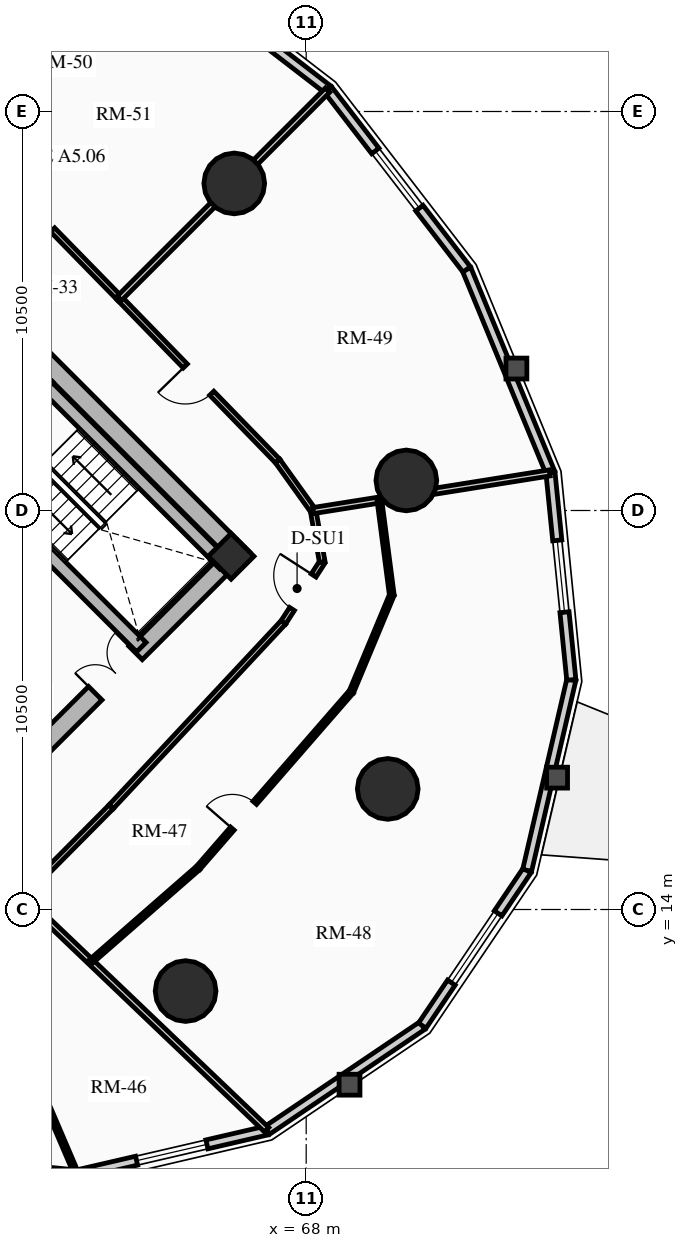
"""IFC4 building model, lengths in metres.
Left out: names, types, materials, properties, quantities, classifications, styles, units other than length and angle.
Written with IfcOpenShell. Run it as: python <this file> out.ifc"""

import sys

from ifc_helpers import new_model, si_unit, direction, frame, frame_2d, origin, origin_2d, place, context, subcontext, project, spatial, rectangle, circle, extrude, source, transform, mapped, element, fill, save


model = new_model("IFC4")
c1 = context("Model", 3, precision=1e-05, world=origin(), true_north=direction((0.0, 1.0)))
c2 = subcontext(c1, "Body", "Model", "MODEL_VIEW")
j1 = project(units=[si_unit("LENGTHUNIT", "METRE"), si_unit("PLANEANGLEUNIT", "RADIAN")], contexts=[c1])
p1 = place(None, origin())
s1 = spatial("IfcSite", under=j1, at=p1, CompositionType="ELEMENT")
p2 = place(p1, origin())
s2 = spatial("IfcBuilding", under=s1, at=p2, CompositionType="ELEMENT")
p3 = place(p2, frame((0.0, 0.0, 51.1)))
s3 = spatial("IfcBuildingStorey", under=s2, at=p3, CompositionType="ELEMENT", Elevation=51.1)
p4 = place(p3, frame((66.339, 23.227, 0.0), z_axis=(0.0, 0.0, 1.0), x_axis=(-0.707106781187, 0.707106781187, 0.0)))
e1 = element("IfcWall", 1, at=p4, inside=s3, PredefinedType="SHEAR", context=c2, shape_type="SweptSolid", body=[
    extrude(rectangle(XDim=14.3, YDim=0.5, at=frame_2d((7.15, 0.0))), origin(), (0.0, 0.0, 1.0), 2.91),
])
p5 = place(p3, frame((58.596, 15.838, 0.0), z_axis=(0.0, 0.0, 1.0), x_axis=(0.707106781187, 0.707106781187, 0.0)))
e2 = element("IfcWall", 2, at=p5, inside=s3, PredefinedType="SHEAR", context=c2, shape_type="SweptSolid", body=[
    extrude(rectangle(XDim=10.7, YDim=0.5, at=frame_2d((5.35, 0.0))), origin(), (0.0, 0.0, 1.0), 2.91),
])
m1 = source(origin(), c2, "Body", "SweptSolid", [
    extrude(rectangle(XDim=1.5, YDim=2.02, at=frame_2d((0.75, 1.01))), frame((0.0, 0.26, 0.0), z_axis=(0.0, -1.0, 0.0), x_axis=(1.0, 0.0, 0.0)), (0.0, 0.0, 1.0), 0.52),
])
p6 = place(p5, frame((5.45, 0.0, 0.0)))
e3 = element("IfcOpeningElement", 3, at=p6, cuts=e2, PredefinedType="OPENING", context=c2, shape_type="MappedRepresentation", body=[
    mapped(m1, transform((0.0, 0.0, 0.0), x_axis=(1.0, 0.0, 0.0), y_axis=(0.0, 1.0, 0.0), z_axis=(0.0, 0.0, 1.0), scale=1.0)),
])
p7 = place(p3, frame((63.662, 20.904, 0.0), z_axis=(0.0, 0.0, 1.0), x_axis=(-0.707106781187, 0.707106781187, 0.0)))
e4 = element("IfcWall", 4, at=p7, inside=s3, PredefinedType="SHEAR", context=c2, shape_type="SweptSolid", body=[
    extrude(rectangle(XDim=13.8, YDim=0.35, at=frame_2d((6.9, 0.0))), origin(), (0.0, 0.0, 1.0), 2.91),
])
m2 = source(origin(), c2, "Body", "SweptSolid", [
    extrude(rectangle(XDim=1.1, YDim=2.015, at=frame_2d((0.55, 1.007))), frame((0.0, 0.185, 0.0), z_axis=(0.0, -1.0, 0.0), x_axis=(1.0, 0.0, 0.0)), (0.0, 0.0, 1.0), 0.37),
])
p8 = place(p7, frame((10.025, 0.0, 0.0)))
e5 = element("IfcOpeningElement", 5, at=p8, cuts=e4, PredefinedType="OPENING", context=c2, shape_type="MappedRepresentation", body=[
    mapped(m2, transform((0.0, 0.0, 0.0), x_axis=(1.0, 0.0, 0.0), y_axis=(0.0, 1.0, 0.0), z_axis=(0.0, 0.0, 1.0), scale=1.0)),
])
p9 = place(p7, frame((12.025, 0.0, 0.0)))
e6 = element("IfcOpeningElement", 6, at=p9, cuts=e4, PredefinedType="OPENING", context=c2, shape_type="MappedRepresentation", body=[
    mapped(m2, transform((0.0, 0.0, 0.0), x_axis=(1.0, 0.0, 0.0), y_axis=(0.0, 1.0, 0.0), z_axis=(0.0, 0.0, 1.0), scale=1.0)),
])
m3 = source(origin(), c2, "Body", "SweptSolid", [
    extrude(rectangle(XDim=1.15, YDim=2.02, at=frame_2d((0.575, 1.01))), frame((0.0, 0.185, 0.0), z_axis=(0.0, -1.0, 0.0), x_axis=(1.0, 0.0, 0.0)), (0.0, 0.0, 1.0), 0.37),
])
p10 = place(p7, frame((5.33, 0.0, 0.0)))
e7 = element("IfcOpeningElement", 7, at=p10, cuts=e4, PredefinedType="OPENING", context=c2, shape_type="MappedRepresentation", body=[
    mapped(m3, transform((0.0, 0.0, 0.0), x_axis=(1.0, 0.0, 0.0), y_axis=(0.0, 1.0, 0.0), z_axis=(0.0, 0.0, 1.0), scale=1.0)),
])
p11 = place(p3, frame((65.847, 23.089, 0.0), z_axis=(0.0, 0.0, 1.0), x_axis=(-0.707106781187, 0.707106781187, 0.0)))
e8 = element("IfcWall", 8, at=p11, inside=s3, PredefinedType="SHEAR", context=c2, shape_type="SweptSolid", body=[
    extrude(rectangle(XDim=6.745, YDim=0.35, at=frame_2d((3.373, 0.0))), origin(), (0.0, 0.0, 1.0), 2.91),
])
p12 = place(p3, frame((58.893, 25.674, 0.0), z_axis=(0.0, 0.0, 1.0), x_axis=(0.707106781187, 0.707106781187, 0.0)))
e9 = element("IfcWall", 9, at=p12, inside=s3, PredefinedType="SHEAR", context=c2, shape_type="SweptSolid", body=[
    extrude(rectangle(XDim=3.285, YDim=0.35, at=frame_2d((1.643, 0.0))), origin(), (0.0, 0.0, 1.0), 2.91),
])
p13 = place(p3, frame((66.024, 23.294, 0.0), z_axis=(0.0, 0.0, 1.0), x_axis=(0.707106781187, 0.707106781187, 0.0)))
e10 = element("IfcColumn", 10, at=p13, inside=s3, PredefinedType="COLUMN", context=c2, shape_type="SweptSolid", body=[
    extrude(rectangle(XDim=0.85, YDim=0.85, at=origin_2d()), origin(), (0.0, 0.0, 1.0), 2.91),
])
for number, where, z_axis, x_axis in (
    (11, (66.107, 33.107, 0.0), (0.0, 0.0, 1.0), (1.0, 0.0, 0.0)),
    (12, (64.827, 11.854, 0.0), (0.0, 0.0, 1.0), (1.0, 0.0, 0.0)),
    (13, (70.146, 17.173, 0.0), (0.0, 0.0, 1.0), (1.0, 0.0, 0.0)),
    (14, (70.635, 25.291, 0.0), (0.0, 0.0, 1.0), (1.0, 0.0, 0.0)),
):
    element("IfcColumn", number, at=place(p3, frame(where, z_axis=z_axis, x_axis=x_axis)), inside=s3, PredefinedType="USERDEFINED", context=c2, shape_type="SweptSolid", body=[
        extrude(circle(Radius=0.8, at=origin_2d()), origin(), (0.0, 0.0, 1.0), 2.91),
    ])
p14 = place(p3, frame((63.844, 39.222, 0.0), z_axis=(0.0, 0.0, 1.0), x_axis=(0.792014314407, -0.610502519057, 0.0)))
e15 = element("IfcWall", 15, at=p14, inside=s3, PredefinedType="SOLIDWALL", context=c2, shape_type="SweptSolid", body=[
    extrude(rectangle(XDim=5.973, YDim=0.24, at=frame_2d((2.987, 0.0))), origin(), (0.0, 0.0, 1.0), 2.073),
])
p15 = place(p3, frame((61.957, 7.024, 0.0), z_axis=(0.0, 0.0, 1.0), x_axis=(-0.994970765694, 0.100165739718, 0.0)))
e16 = element("IfcWall", 16, at=p15, inside=s3, PredefinedType="SOLIDWALL", context=c2, shape_type="SweptSolid", body=[
    extrude(rectangle(XDim=5.477, YDim=0.24, at=frame_2d((2.738, 0.0))), origin(), (0.0, 0.0, 1.0), 2.073),
])
m4 = source(origin(), c2, "Body", "SweptSolid", [
    extrude(rectangle(XDim=2.2, YDim=1.35, at=frame_2d((1.1, 0.675))), frame((0.0, 0.13, 0.0), z_axis=(0.0, -1.0, 0.0), x_axis=(1.0, 0.0, 0.0)), (0.0, 0.0, 1.0), 0.26),
])
p16 = place(p15, frame((1.638, 0.0, 0.65)))
e17 = element("IfcOpeningElement", 17, at=p16, cuts=e16, PredefinedType="OPENING", context=c2, shape_type="MappedRepresentation", body=[
    mapped(m4, transform((0.0, 0.0, 0.0), x_axis=(1.0, 0.0, 0.0), y_axis=(0.0, 1.0, 0.0), z_axis=(0.0, 0.0, 1.0), scale=1.0)),
])
p17 = place(p3, frame((66.969, 8.186, 0.0), z_axis=(0.0, 0.0, 1.0), x_axis=(-0.974166016949, -0.225833060959, 0.0)))
e18 = element("IfcWall", 18, at=p17, inside=s3, PredefinedType="SOLIDWALL", context=c2, shape_type="SweptSolid", body=[
    extrude(rectangle(XDim=5.146, YDim=0.24, at=frame_2d((2.573, 0.0))), origin(), (0.0, 0.0, 1.0), 2.073),
])
m5 = source(origin(), c2, "Body", "SweptSolid", [
    extrude(rectangle(XDim=1.9, YDim=1.35, at=frame_2d((0.95, 0.675))), frame((0.0, 0.13, 0.0), z_axis=(0.0, -1.0, 0.0), x_axis=(1.0, 0.0, 0.0)), (0.0, 0.0, 1.0), 0.26),
])
p18 = place(p17, frame((1.623, 0.0, 0.65)))
e19 = element("IfcOpeningElement", 19, at=p18, cuts=e18, PredefinedType="OPENING", context=c2, shape_type="MappedRepresentation", body=[
    mapped(m5, transform((0.0, 0.0, 0.0), x_axis=(1.0, 0.0, 0.0), y_axis=(0.0, 1.0, 0.0), z_axis=(0.0, 0.0, 1.0), scale=1.0)),
])
p19 = place(p3, frame((71.055, 10.945, 0.0), z_axis=(0.0, 0.0, 1.0), x_axis=(-0.828736708604, -0.559638693991, 0.0)))
e20 = element("IfcWall", 20, at=p19, inside=s3, PredefinedType="SOLIDWALL", context=c2, shape_type="SweptSolid", body=[
    extrude(rectangle(XDim=4.93, YDim=0.24, at=frame_2d((2.465, 0.0))), origin(), (0.0, 0.0, 1.0), 2.073),
])
p20 = place(p3, frame((73.814, 15.031, 0.0), z_axis=(0.0, 0.0, 1.0), x_axis=(-0.559638693991, -0.828736708604, 0.0)))
e21 = element("IfcWall", 21, at=p20, inside=s3, PredefinedType="SOLIDWALL", context=c2, shape_type="SweptSolid", body=[
    extrude(rectangle(XDim=4.93, YDim=0.24, at=frame_2d((2.465, 0.0))), origin(), (0.0, 0.0, 1.0), 2.073),
])
p21 = place(p20, frame((1.365, 0.0, 0.65)))
e22 = element("IfcOpeningElement", 22, at=p21, cuts=e21, PredefinedType="OPENING", context=c2, shape_type="MappedRepresentation", body=[
    mapped(m4, transform((0.0, 0.0, 0.0), x_axis=(1.0, 0.0, 0.0), y_axis=(0.0, 1.0, 0.0), z_axis=(0.0, 0.0, 1.0), scale=1.0)),
])
p22 = place(p3, frame((74.976, 20.043, 0.0), z_axis=(0.0, 0.0, 1.0), x_axis=(-0.225833060959, -0.974166016949, 0.0)))
e23 = element("IfcWall", 23, at=p22, inside=s3, PredefinedType="SOLIDWALL", context=c2, shape_type="SweptSolid", body=[
    extrude(rectangle(XDim=5.146, YDim=0.24, at=frame_2d((2.573, 0.0))), origin(), (0.0, 0.0, 1.0), 2.073),
])
p23 = place(p3, frame((74.428, 25.493, 0.0), z_axis=(0.0, 0.0, 1.0), x_axis=(0.100165739718, -0.994970765694, 0.0)))
e24 = element("IfcWall", 24, at=p23, inside=s3, PredefinedType="SOLIDWALL", context=c2, shape_type="SweptSolid", body=[
    extrude(rectangle(XDim=5.477, YDim=0.24, at=frame_2d((2.738, 0.0))), origin(), (0.0, 0.0, 1.0), 2.073),
])
p24 = place(p23, frame((1.788, 0.0, 0.65)))
e25 = element("IfcOpeningElement", 25, at=p24, cuts=e24, PredefinedType="OPENING", context=c2, shape_type="MappedRepresentation", body=[
    mapped(m5, transform((0.0, 0.0, 0.0), x_axis=(1.0, 0.0, 0.0), y_axis=(0.0, 1.0, 0.0), z_axis=(0.0, 0.0, 1.0), scale=1.0)),
])
p25 = place(p3, frame((72.222, 30.844, 0.0), z_axis=(0.0, 0.0, 1.0), x_axis=(0.381027682565, -0.924563629567, 0.0)))
e26 = element("IfcWall", 26, at=p25, inside=s3, PredefinedType="SOLIDWALL", context=c2, shape_type="SweptSolid", body=[
    extrude(rectangle(XDim=5.789, YDim=0.24, at=frame_2d((2.894, 0.0))), origin(), (0.0, 0.0, 1.0), 2.073),
])
p26 = place(p3, frame((68.575, 35.575, 0.0), z_axis=(0.0, 0.0, 1.0), x_axis=(0.610502519057, -0.792014314407, 0.0)))
e27 = element("IfcWall", 27, at=p26, inside=s3, PredefinedType="SOLIDWALL", context=c2, shape_type="SweptSolid", body=[
    extrude(rectangle(XDim=5.973, YDim=0.24, at=frame_2d((2.987, 0.0))), origin(), (0.0, 0.0, 1.0), 2.073),
])
p27 = place(p26, frame((2.037, 0.0, 0.65)))
e28 = element("IfcOpeningElement", 28, at=p27, cuts=e27, PredefinedType="OPENING", context=c2, shape_type="MappedRepresentation", body=[
    mapped(m5, transform((0.0, 0.0, 0.0), x_axis=(1.0, 0.0, 0.0), y_axis=(0.0, 1.0, 0.0), z_axis=(0.0, 0.0, 1.0), scale=1.0)),
])
p28 = place(p3, frame((63.086, 30.086, 0.0), z_axis=(0.0, 0.0, 1.0), x_axis=(-0.699032802832, 0.715089603172, 0.0)))
e29 = element("IfcWall", 29, at=p28, inside=s3, PredefinedType="PARTITIONING", context=c2, shape_type="SweptSolid", body=[
    extrude(rectangle(XDim=6.082, YDim=0.15, at=frame_2d((3.041, 0.0))), origin(), (0.0, 0.0, 1.0), 2.159),
])
m6 = source(origin(), c2, "Body", "SweptSolid", [
    extrude(rectangle(XDim=1.05, YDim=2.015, at=frame_2d((0.525, 1.007))), frame((0.0, 0.085, 0.0), z_axis=(0.0, -1.0, 0.0), x_axis=(1.0, 0.0, 0.0)), (0.0, 0.0, 1.0), 0.17),
])
p29 = place(p28, frame((2.516, 0.0, 0.0)))
e30 = element("IfcOpeningElement", 30, at=p29, cuts=e29, PredefinedType="OPENING", context=c2, shape_type="MappedRepresentation", body=[
    mapped(m6, transform((0.0, 0.0, 0.0), x_axis=(1.0, 0.0, 0.0), y_axis=(0.0, 1.0, 0.0), z_axis=(0.0, 0.0, 1.0), scale=1.0)),
])
p30 = place(p3, frame((60.528, 14.344, 0.0), z_axis=(0.0, 0.0, 1.0), x_axis=(0.704381645997, 0.709821454158, 0.0)))
e31 = element("IfcWall", 31, at=p30, inside=s3, PredefinedType="PARTITIONING", context=c2, shape_type="SweptSolid", body=[
    extrude(rectangle(XDim=3.321, YDim=0.15, at=frame_2d((1.661, 0.0))), origin(), (0.0, 0.0, 1.0), 2.159),
])
p31 = place(p3, frame((62.867, 16.702, 0.0), z_axis=(0.0, 0.0, 1.0), x_axis=(0.682449206191, 0.73093302085, 0.0)))
e32 = element("IfcWall", 32, at=p31, inside=s3, PredefinedType="PARTITIONING", context=c2, shape_type="SweptSolid", body=[
    extrude(rectangle(XDim=6.642, YDim=0.15, at=frame_2d((3.321, 0.0))), origin(), (0.0, 0.0, 1.0), 2.159),
])
p32 = place(p3, frame((67.4, 21.556, 0.0), z_axis=(0.0, 0.0, 1.0), x_axis=(0.542247692187, 0.840218686009, 0.0)))
e33 = element("IfcWall", 33, at=p32, inside=s3, PredefinedType="PARTITIONING", context=c2, shape_type="SweptSolid", body=[
    extrude(rectangle(XDim=1.887, YDim=0.15, at=frame_2d((0.943, 0.0))), origin(), (0.0, 0.0, 1.0), 2.205),
])
p33 = place(p32, frame((0.419, 0.0, 0.0)))
e34 = element("IfcOpeningElement", 34, at=p33, cuts=e33, PredefinedType="OPENING", context=c2, shape_type="MappedRepresentation", body=[
    mapped(m6, transform((0.0, 0.0, 0.0), x_axis=(1.0, 0.0, 0.0), y_axis=(0.0, 1.0, 0.0), z_axis=(0.0, 0.0, 1.0), scale=1.0)),
])
p34 = place(p3, frame((68.423, 23.142, 0.0), z_axis=(0.0, 0.0, 1.0), x_axis=(-0.174796562349, 0.984604571283, 0.0)))
e35 = element("IfcWall", 35, at=p34, inside=s3, PredefinedType="PARTITIONING", context=c2, shape_type="SweptSolid", body=[
    extrude(rectangle(XDim=1.377, YDim=0.15, at=frame_2d((0.688, 0.0))), origin(), (0.0, 0.0, 1.0), 2.159),
])
p35 = place(p3, frame((68.182, 24.498, 0.0), z_axis=(0.0, 0.0, 1.0), x_axis=(-0.582532339525, 0.812807525437, 0.0)))
e36 = element("IfcWall", 36, at=p35, inside=s3, PredefinedType="PARTITIONING", context=c2, shape_type="SweptSolid", body=[
    extrude(rectangle(XDim=1.605, YDim=0.15, at=frame_2d((0.803, 0.0))), origin(), (0.0, 0.0, 1.0), 2.205),
])
p36 = place(p3, frame((67.247, 25.802, 0.0), z_axis=(0.0, 0.0, 1.0), x_axis=(-0.696771261687, 0.71729339108, 0.0)))
e37 = element("IfcWall", 37, at=p36, inside=s3, PredefinedType="PARTITIONING", context=c2, shape_type="SweptSolid", body=[
    extrude(rectangle(XDim=5.972, YDim=0.15, at=frame_2d((2.986, 0.0))), origin(), (0.0, 0.0, 1.0), 2.635),
])
m7 = source(origin(), c2, "Body", "SweptSolid", [
    extrude(rectangle(XDim=1.0, YDim=2.015, at=frame_2d((0.5, 1.007))), frame((0.0, 0.085, 0.0), z_axis=(0.0, -1.0, 0.0), x_axis=(1.0, 0.0, 0.0)), (0.0, 0.0, 1.0), 0.17),
])
p37 = place(p36, frame((2.486, 0.0, 0.0)))
e38 = element("IfcOpeningElement", 38, at=p37, cuts=e37, PredefinedType="OPENING", context=c2, shape_type="MappedRepresentation", body=[
    mapped(m7, transform((0.0, 0.0, 0.0), x_axis=(1.0, 0.0, 0.0), y_axis=(0.0, 1.0, 0.0), z_axis=(0.0, 0.0, 1.0), scale=1.0)),
])
p38 = place(p3, frame((63.086, 30.086, 0.0), z_axis=(0.0, 0.0, 1.0), x_axis=(0.707106781187, 0.707106781187, 0.0)))
e39 = element("IfcWall", 39, at=p38, inside=s3, PredefinedType="PARTITIONING", context=c2, shape_type="SweptSolid", body=[
    extrude(rectangle(XDim=7.743, YDim=0.16, at=frame_2d((3.872, 0.0))), origin(), (0.0, 0.0, 1.0), 2.073),
])
p39 = place(p3, frame((60.528, 14.344, 0.0), z_axis=(0.0, 0.0, 1.0), x_axis=(0.723320016743, -0.690512963947, 0.0)))
e40 = element("IfcWall", 40, at=p39, inside=s3, PredefinedType="PARTITIONING", context=c2, shape_type="SweptSolid", body=[
    extrude(rectangle(XDim=8.893, YDim=0.16, at=frame_2d((4.446, 0.0))), origin(), (0.0, 0.0, 1.0), 2.073),
])
p40 = place(p3, frame((68.182, 24.498, 0.0), z_axis=(0.0, 0.0, 1.0), x_axis=(0.987550107246, 0.157304754152, 0.0)))
e41 = element("IfcWall", 41, at=p40, inside=s3, PredefinedType="PARTITIONING", context=c2, shape_type="SweptSolid", body=[
    extrude(rectangle(XDim=6.304, YDim=0.16, at=frame_2d((3.152, 0.0))), origin(), (0.0, 0.0, 1.0), 2.073),
])
p41 = place(p3, frame((58.975, 13.996, 0.0), z_axis=(0.0, 0.0, 1.0), x_axis=(0.393755664375, -0.919215141723, 0.0)))
e42 = element("IfcWall", 42, at=p41, inside=s3, PredefinedType="PARTITIONING", context=c2, shape_type="SweptSolid", body=[
    extrude(rectangle(XDim=7.563, YDim=0.125, at=frame_2d((3.782, 0.0))), origin(), (0.0, 0.0, 1.0), 2.073),
])
m8 = source(origin(), c2, "Body", "SweptSolid", [
    extrude(rectangle(XDim=0.9, YDim=2.005, at=frame_2d((0.45, 1.002))), frame((0.0, 0.073, 0.0), z_axis=(0.0, -1.0, 0.0), x_axis=(1.0, 0.0, 0.0)), (0.0, 0.0, 1.0), 0.145),
])
p42 = place(p41, frame((1.8, 0.0, 0.0)))
e43 = element("IfcOpeningElement", 43, at=p42, cuts=e42, PredefinedType="OPENING", context=c2, shape_type="MappedRepresentation", body=[
    mapped(m8, transform((0.0, 0.0, 0.0), x_axis=(1.0, 0.0, 0.0), y_axis=(0.0, 1.0, 0.0), z_axis=(0.0, 0.0, 1.0), scale=1.0)),
])
p43 = place(p3, frame((62.329, 12.625, 0.0), z_axis=(0.0, 0.0, 1.0), x_axis=(0.753237140985, 0.657749047465, 0.0)))
e44 = element("IfcWall", 44, at=p43, inside=s3, PredefinedType="PARTITIONING", context=c2, shape_type="SweptSolid", body=[
    extrude(rectangle(XDim=3.753, YDim=0.125, at=frame_2d((1.877, 0.0))), origin(), (0.0, 0.0, 1.0), 2.159),
])
p44 = place(p3, frame((65.156, 15.094, 0.0), z_axis=(0.0, 0.0, 1.0), x_axis=(0.656356662483, 0.754450748302, 0.0)))
e45 = element("IfcWall", 45, at=p44, inside=s3, PredefinedType="PARTITIONING", context=c2, shape_type="SweptSolid", body=[
    extrude(rectangle(XDim=6.147, YDim=0.125, at=frame_2d((3.074, 0.0))), origin(), (0.0, 0.0, 1.0), 2.159),
])
p45 = place(p44, frame((1.372, 0.0, 0.0)))
e46 = element("IfcOpeningElement", 46, at=p45, cuts=e45, PredefinedType="OPENING", context=c2, shape_type="MappedRepresentation", body=[
    mapped(m8, transform((0.0, 0.0, 0.0), x_axis=(1.0, 0.0, 0.0), y_axis=(0.0, 1.0, 0.0), z_axis=(0.0, 0.0, 1.0), scale=1.0)),
])
p46 = place(p3, frame((69.191, 19.732, 0.0), z_axis=(0.0, 0.0, 1.0), x_axis=(0.385156247749, 0.922851377427, 0.0)))
e47 = element("IfcWall", 47, at=p46, inside=s3, PredefinedType="PARTITIONING", context=c2, shape_type="SweptSolid", body=[
    extrude(rectangle(XDim=2.756, YDim=0.125, at=frame_2d((1.378, 0.0))), origin(), (0.0, 0.0, 1.0), 2.205),
])
p47 = place(p3, frame((70.252, 22.275, 0.0), z_axis=(0.0, 0.0, 1.0), x_axis=(-0.129645482902, 0.991560411051, 0.0)))
e48 = element("IfcWall", 48, at=p47, inside=s3, PredefinedType="PARTITIONING", context=c2, shape_type="SweptSolid", body=[
    extrude(rectangle(XDim=2.521, YDim=0.125, at=frame_2d((1.261, 0.0))), origin(), (0.0, 0.0, 1.0), 2.635),
])
m9 = source(origin(), c2, "Body", "SweptSolid", [
    extrude(rectangle(XDim=1.9, YDim=1.35, at=frame_2d((0.95, 0.675))), frame((0.0, 0.03, 0.0), z_axis=(0.0, -1.0, 0.0), x_axis=(1.0, 0.0, 0.0)), (0.0, 0.0, 1.0), 0.06),
])
p48 = place(p18, origin())
e49 = element("IfcWindow", 49, at=p48, inside=s3, PartitioningType="DOUBLE_PANEL_VERTICAL", PredefinedType="WINDOW", context=c2, shape_type="MappedRepresentation", body=[
    mapped(m9, transform((0.0, 0.0, 0.0), x_axis=(1.0, 0.0, 0.0), y_axis=(0.0, 1.0, 0.0), z_axis=(0.0, 0.0, 1.0), scale=1.0)),
])
fill(e19, e49)
m10 = source(origin(), c2, "Body", "SweptSolid", [
    extrude(rectangle(XDim=2.2, YDim=1.35, at=frame_2d((1.1, 0.675))), frame((0.0, 0.03, 0.0), z_axis=(0.0, -1.0, 0.0), x_axis=(1.0, 0.0, 0.0)), (0.0, 0.0, 1.0), 0.06),
])
p49 = place(p21, origin())
e50 = element("IfcWindow", 50, at=p49, inside=s3, PartitioningType="DOUBLE_PANEL_VERTICAL", PredefinedType="WINDOW", context=c2, shape_type="MappedRepresentation", body=[
    mapped(m10, transform((0.0, 0.0, 0.0), x_axis=(1.0, 0.0, 0.0), y_axis=(0.0, 1.0, 0.0), z_axis=(0.0, 0.0, 1.0), scale=1.0)),
])
fill(e22, e50)
p50 = place(p24, origin())
e51 = element("IfcWindow", 51, at=p50, inside=s3, PartitioningType="DOUBLE_PANEL_VERTICAL", PredefinedType="WINDOW", context=c2, shape_type="MappedRepresentation", body=[
    mapped(m9, transform((0.0, 0.0, 0.0), x_axis=(1.0, 0.0, 0.0), y_axis=(0.0, 1.0, 0.0), z_axis=(0.0, 0.0, 1.0), scale=1.0)),
])
fill(e25, e51)
p51 = place(p27, origin())
e52 = element("IfcWindow", 52, at=p51, inside=s3, PartitioningType="DOUBLE_PANEL_VERTICAL", PredefinedType="WINDOW", context=c2, shape_type="MappedRepresentation", body=[
    mapped(m9, transform((0.0, 0.0, 0.0), x_axis=(1.0, 0.0, 0.0), y_axis=(0.0, 1.0, 0.0), z_axis=(0.0, 0.0, 1.0), scale=1.0)),
])
fill(e28, e52)
m11 = source(origin(), c2, "Body", "SweptSolid", [
    extrude(rectangle(XDim=1.5, YDim=2.02, at=frame_2d((0.75, 1.01))), frame((0.0, 0.025, 0.0), z_axis=(0.0, -1.0, 0.0), x_axis=(1.0, 0.0, 0.0)), (0.0, 0.0, 1.0), 0.05),
])
p52 = place(p6, origin())
e53 = element("IfcDoor", 53, at=p52, inside=s3, OperationType="DOUBLE_DOOR_SINGLE_SWING", PredefinedType="DOOR", context=c2, shape_type="MappedRepresentation", body=[
    mapped(m11, transform((0.0, 0.0, 0.0), x_axis=(1.0, 0.0, 0.0), y_axis=(0.0, 1.0, 0.0), z_axis=(0.0, 0.0, 1.0), scale=1.0)),
])
fill(e3, e53)
m12 = source(origin(), c2, "Body", "SweptSolid", [
    extrude(rectangle(XDim=1.05, YDim=2.015, at=frame_2d((0.525, 1.007))), frame((0.0, 0.025, 0.0), z_axis=(0.0, -1.0, 0.0), x_axis=(1.0, 0.0, 0.0)), (0.0, 0.0, 1.0), 0.05),
])
p53 = place(p33, origin())
e54 = element("IfcDoor", 54, at=p53, inside=s3, OperationType="SINGLE_SWING_RIGHT", PredefinedType="DOOR", context=c2, shape_type="MappedRepresentation", body=[
    mapped(m12, transform((0.0, 0.0, 0.0), x_axis=(1.0, 0.0, 0.0), y_axis=(0.0, 1.0, 0.0), z_axis=(0.0, 0.0, 1.0), scale=1.0)),
])
fill(e34, e54)
m13 = source(origin(), c2, "Body", "SweptSolid", [
    extrude(rectangle(XDim=0.9, YDim=2.005, at=frame_2d((0.45, 1.002))), frame((0.0, 0.025, 0.0), z_axis=(0.0, -1.0, 0.0), x_axis=(1.0, 0.0, 0.0)), (0.0, 0.0, 1.0), 0.05),
])
p54 = place(p45, origin())
e55 = element("IfcDoor", 55, at=p54, inside=s3, OperationType="SINGLE_SWING_LEFT", PredefinedType="DOOR", context=c2, shape_type="MappedRepresentation", body=[
    mapped(m13, transform((0.0, 0.0, 0.0), x_axis=(1.0, 0.0, 0.0), y_axis=(0.0, 1.0, 0.0), z_axis=(0.0, 0.0, 1.0), scale=1.0)),
])
fill(e46, e55)
m14 = source(origin(), c2, "Body", "SweptSolid", [
    extrude(rectangle(XDim=1.0, YDim=2.015, at=frame_2d((0.5, 1.007))), frame((0.0, 0.025, 0.0), z_axis=(0.0, -1.0, 0.0), x_axis=(1.0, 0.0, 0.0)), (0.0, 0.0, 1.0), 0.05),
])
p55 = place(p37, origin())
e56 = element("IfcDoor", 56, at=p55, inside=s3, OperationType="SINGLE_SWING_RIGHT", PredefinedType="DOOR", context=c2, shape_type="MappedRepresentation", body=[
    mapped(m14, transform((0.0, 0.0, 0.0), x_axis=(1.0, 0.0, 0.0), y_axis=(0.0, 1.0, 0.0), z_axis=(0.0, 0.0, 1.0), scale=1.0)),
])
fill(e38, e56)
p56 = place(p29, origin())
e57 = element("IfcDoor", 57, at=p56, inside=s3, OperationType="SINGLE_SWING_LEFT", PredefinedType="DOOR", context=c2, shape_type="MappedRepresentation", body=[
    mapped(m12, transform((0.0, 0.0, 0.0), x_axis=(1.0, 0.0, 0.0), y_axis=(0.0, 1.0, 0.0), z_axis=(0.0, 0.0, 1.0), scale=1.0)),
])
fill(e30, e57)
save(model, sys.argv[1])
